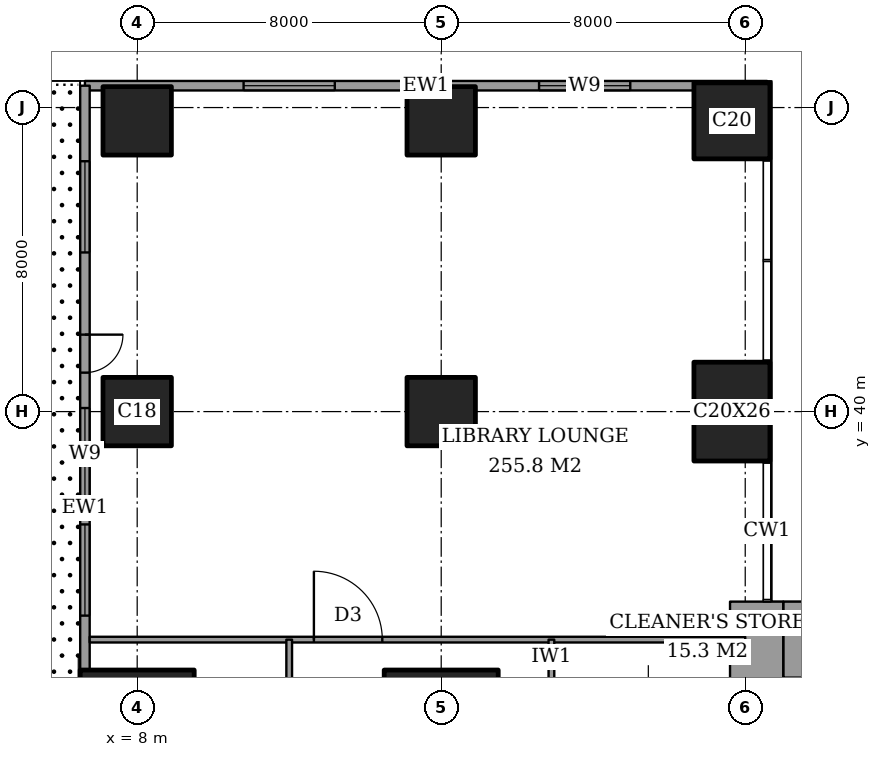
"""IFC4 building model, lengths in metres.
Left out: names, types, materials, properties, quantities, classifications, styles, units other than length and angle.
Written with IfcOpenShell. Run it as: python <this file> out.ifc"""

import sys

from ifc_helpers import new_model, si_unit, direction, frame, frame_2d, origin, origin_2d, place, context, subcontext, project, spatial, rectangle, extrude, element, fill, save


model = new_model("IFC4")
c1 = context("Model", 3, precision=1e-05, world=origin(), true_north=direction((0.0, 1.0)))
c2 = subcontext(c1, "Body", "Model", "MODEL_VIEW")
j1 = project(units=[si_unit("LENGTHUNIT", "METRE"), si_unit("PLANEANGLEUNIT", "RADIAN")], contexts=[c1])
p1 = place(None, origin())
s1 = spatial("IfcSite", under=j1, at=p1, CompositionType="ELEMENT")
p2 = place(p1, origin())
s2 = spatial("IfcBuilding", under=s1, at=p2, CompositionType="ELEMENT")
p3 = place(p2, frame((0.0, 0.0, 218.2)))
s3 = spatial("IfcBuildingStorey", under=s2, at=p3, CompositionType="ELEMENT", Elevation=218.2)
p4 = place(p3, frame((8.0, 32.0, 0.0), z_axis=(0.0, 0.0, 1.0), x_axis=(1.0, 0.0, 0.0)))
e1 = element("IfcColumn", 1, at=p4, inside=s3, PredefinedType="COLUMN", context=c2, shape_type="SweptSolid", body=[
    extrude(rectangle(XDim=3.0, YDim=2.4, at=origin_2d()), origin(), (0.0, 0.0, 1.0), 3.6),
])
for number, where, z_axis, x_axis in (
    (2, (8.0, 40.0, 0.0), (0.0, 0.0, 1.0), (1.0, 0.0, 0.0)),
    (3, (8.0, 47.65, 0.0), (0.0, 0.0, 1.0), (1.0, 0.0, 0.0)),
):
    element("IfcColumn", number, at=place(p3, frame(where, z_axis=z_axis, x_axis=x_axis)), inside=s3, PredefinedType="COLUMN", context=c2, shape_type="SweptSolid", body=[
        extrude(rectangle(XDim=1.8, YDim=1.8, at=origin_2d()), origin(), (0.0, 0.0, 1.0), 3.6),
    ])
p5 = place(p3, frame((16.0, 32.0, 0.0), z_axis=(0.0, 0.0, 1.0), x_axis=(1.0, 0.0, 0.0)))
e4 = element("IfcColumn", 4, at=p5, inside=s3, PredefinedType="COLUMN", context=c2, shape_type="SweptSolid", body=[
    extrude(rectangle(XDim=3.0, YDim=2.4, at=origin_2d()), origin(), (0.0, 0.0, 1.0), 3.6),
])
for number, where, z_axis, x_axis in (
    (5, (16.0, 40.0, 0.0), (0.0, 0.0, 1.0), (1.0, 0.0, 0.0)),
    (6, (16.0, 47.65, 0.0), (0.0, 0.0, 1.0), (1.0, 0.0, 0.0)),
):
    element("IfcColumn", number, at=place(p3, frame(where, z_axis=z_axis, x_axis=x_axis)), inside=s3, PredefinedType="COLUMN", context=c2, shape_type="SweptSolid", body=[
        extrude(rectangle(XDim=1.8, YDim=1.8, at=origin_2d()), origin(), (0.0, 0.0, 1.0), 3.6),
    ])
p6 = place(p3, frame((23.65, 40.0, 0.0), z_axis=(0.0, 0.0, 1.0), x_axis=(1.0, 0.0, 0.0)))
e7 = element("IfcColumn", 7, at=p6, inside=s3, PredefinedType="COLUMN", context=c2, shape_type="SweptSolid", body=[
    extrude(rectangle(XDim=2.0, YDim=2.6, at=origin_2d()), origin(), (0.0, 0.0, 1.0), 3.6),
])
p7 = place(p3, frame((23.65, 47.65, 0.0), z_axis=(0.0, 0.0, 1.0), x_axis=(1.0, 0.0, 0.0)))
e8 = element("IfcColumn", 8, at=p7, inside=s3, PredefinedType="COLUMN", context=c2, shape_type="SweptSolid", body=[
    extrude(rectangle(XDim=2.0, YDim=2.0, at=origin_2d()), origin(), (0.0, 0.0, 1.0), 3.6),
])
p8 = place(p3, frame((25.0, 34.0, 0.0), z_axis=(0.0, 0.0, 1.0), x_axis=(1.0, 0.0, 0.0)))
e9 = element("IfcWall", 9, at=p8, inside=s3, PredefinedType="SHEAR", context=c2, shape_type="SweptSolid", body=[
    extrude(rectangle(XDim=3.15, YDim=2.0, at=frame_2d((1.575, 0.0))), origin(), (0.0, 0.0, 1.0), 3.6),
])
p9 = place(p3, frame((24.3, 23.15, 0.0), z_axis=(0.0, 0.0, 1.0), x_axis=(0.0, 1.0, 0.0)))
e10 = element("IfcWall", 10, at=p9, inside=s3, PredefinedType="SHEAR", context=c2, shape_type="SweptSolid", body=[
    extrude(rectangle(XDim=11.85, YDim=1.4, at=frame_2d((5.925, 0.0))), origin(), (0.0, 0.0, 1.0), 3.6),
])
p10 = place(p9, frame((0.75, 0.0, 0.0)))
e11 = element("IfcOpeningElement", 11, at=p10, cuts=e10, PredefinedType="OPENING", context=c2, shape_type="SweptSolid", body=[
    extrude(rectangle(XDim=1.8, YDim=2.4, at=frame_2d((0.9, 1.2))), frame((0.0, 0.71, 0.0), z_axis=(0.0, -1.0, 0.0), x_axis=(1.0, 0.0, 0.0)), (0.0, 0.0, 1.0), 1.42),
])
p11 = place(p3, frame((24.575, 48.575, 0.0), z_axis=(0.0, 0.0, 1.0), x_axis=(-1.0, 0.0, 0.0)))
e12 = element("IfcWall", 12, at=p11, inside=s3, PredefinedType="SOLIDWALL", context=c2, shape_type="SweptSolid", body=[
    extrude(rectangle(XDim=17.95, YDim=0.25, at=frame_2d((8.975, 0.0))), origin(), (0.0, 0.0, 1.0), 3.6),
])
p12 = place(p11, frame((3.6, 0.0, 0.2)))
e13 = element("IfcOpeningElement", 13, at=p12, cuts=e12, PredefinedType="OPENING", context=c2, shape_type="SweptSolid", body=[
    extrude(rectangle(XDim=2.4, YDim=2.4, at=frame_2d((1.2, 1.2))), frame((0.0, 0.135, 0.0), z_axis=(0.0, -1.0, 0.0), x_axis=(1.0, 0.0, 0.0)), (0.0, 0.0, 1.0), 0.27),
])
p13 = place(p11, frame((11.375, 0.0, 0.2)))
e14 = element("IfcOpeningElement", 14, at=p13, cuts=e12, PredefinedType="OPENING", context=c2, shape_type="SweptSolid", body=[
    extrude(rectangle(XDim=2.4, YDim=2.4, at=frame_2d((1.2, 1.2))), frame((0.0, 0.135, 0.0), z_axis=(0.0, -1.0, 0.0), x_axis=(1.0, 0.0, 0.0)), (0.0, 0.0, 1.0), 0.27),
])
p14 = place(p3, frame((6.625, 48.575, 0.0), z_axis=(0.0, 0.0, 1.0), x_axis=(0.0, -1.0, 0.0)))
e15 = element("IfcWall", 15, at=p14, inside=s3, PredefinedType="SOLIDWALL", context=c2, shape_type="SweptSolid", body=[
    extrude(rectangle(XDim=20.225, YDim=0.25, at=frame_2d((10.112, 0.0))), origin(), (0.0, 0.0, 1.0), 3.6),
])
p15 = place(p14, frame((6.55, 0.0, 0.0)))
e16 = element("IfcOpeningElement", 16, at=p15, cuts=e15, PredefinedType="OPENING", context=c2, shape_type="SweptSolid", body=[
    extrude(rectangle(XDim=1.0, YDim=2.4, at=frame_2d((0.5, 1.2))), frame((0.0, 0.135, 0.0), z_axis=(0.0, -1.0, 0.0), x_axis=(1.0, 0.0, 0.0)), (0.0, 0.0, 1.0), 0.27),
])
p16 = place(p14, frame((1.988, 0.0, 0.2)))
e17 = element("IfcOpeningElement", 17, at=p16, cuts=e15, PredefinedType="OPENING", context=c2, shape_type="SweptSolid", body=[
    extrude(rectangle(XDim=2.4, YDim=2.4, at=frame_2d((1.2, 1.2))), frame((0.0, 0.135, 0.0), z_axis=(0.0, -1.0, 0.0), x_axis=(1.0, 0.0, 0.0)), (0.0, 0.0, 1.0), 0.27),
])
p17 = place(p14, frame((8.481, 0.0, 0.2)))
e18 = element("IfcOpeningElement", 18, at=p17, cuts=e15, PredefinedType="OPENING", context=c2, shape_type="SweptSolid", body=[
    extrude(rectangle(XDim=2.4, YDim=2.4, at=frame_2d((1.2, 1.2))), frame((0.0, 0.135, 0.0), z_axis=(0.0, -1.0, 0.0), x_axis=(1.0, 0.0, 0.0)), (0.0, 0.0, 1.0), 0.27),
])
p18 = place(p14, frame((11.544, 0.0, 0.2)))
e19 = element("IfcOpeningElement", 19, at=p18, cuts=e15, PredefinedType="OPENING", context=c2, shape_type="SweptSolid", body=[
    extrude(rectangle(XDim=2.4, YDim=2.4, at=frame_2d((1.2, 1.2))), frame((0.0, 0.135, 0.0), z_axis=(0.0, -1.0, 0.0), x_axis=(1.0, 0.0, 0.0)), (0.0, 0.0, 1.0), 0.27),
])
p19 = place(p14, frame((18.488, 0.0, 0.0)))
e20 = element("IfcOpeningElement", 20, at=p19, cuts=e15, PredefinedType="OPENING", context=c2, shape_type="SweptSolid", body=[
    extrude(rectangle(XDim=1.0, YDim=2.4, at=frame_2d((0.5, 1.2))), frame((0.0, 0.135, 0.0), z_axis=(0.0, -1.0, 0.0), x_axis=(1.0, 0.0, 0.0)), (0.0, 0.0, 1.0), 0.27),
])
p20 = place(p3, frame((6.75, 34.0, 0.0), z_axis=(0.0, 0.0, 1.0), x_axis=(1.0, 0.0, 0.0)))
e21 = element("IfcWall", 21, at=p20, inside=s3, PredefinedType="PARTITIONING", context=c2, shape_type="SweptSolid", body=[
    extrude(rectangle(XDim=17.25, YDim=0.15, at=frame_2d((8.625, 0.0))), origin(), (0.0, 0.0, 1.0), 3.35),
])
p21 = place(p20, frame((5.9, 0.0, 0.0)))
e22 = element("IfcOpeningElement", 22, at=p21, cuts=e21, PredefinedType="OPENING", context=c2, shape_type="SweptSolid", body=[
    extrude(rectangle(XDim=1.8, YDim=2.1, at=frame_2d((0.9, 1.05))), frame((0.0, 0.085, 0.0), z_axis=(0.0, -1.0, 0.0), x_axis=(1.0, 0.0, 0.0)), (0.0, 0.0, 1.0), 0.17),
])
p22 = place(p3, frame((12.0, 14.0, 0.0), z_axis=(0.0, 0.0, 1.0), x_axis=(0.0, 1.0, 0.0)))
e23 = element("IfcWall", 23, at=p22, inside=s3, PredefinedType="PARTITIONING", context=c2, shape_type="SweptSolid", body=[
    extrude(rectangle(XDim=20.0, YDim=0.15, at=frame_2d((10.0, 0.0))), origin(), (0.0, 0.0, 1.0), 3.35),
])
p23 = place(p22, frame((9.1, 0.0, 0.0)))
e24 = element("IfcOpeningElement", 24, at=p23, cuts=e23, PredefinedType="OPENING", context=c2, shape_type="SweptSolid", body=[
    extrude(rectangle(XDim=1.8, YDim=2.1, at=frame_2d((0.9, 1.05))), frame((0.0, 0.085, 0.0), z_axis=(0.0, -1.0, 0.0), x_axis=(1.0, 0.0, 0.0)), (0.0, 0.0, 1.0), 0.17),
])
p24 = place(p3, frame((18.9, 31.0, 0.0), z_axis=(0.0, 0.0, 1.0), x_axis=(0.0, 1.0, 0.0)))
e25 = element("IfcWall", 25, at=p24, inside=s3, PredefinedType="PARTITIONING", context=c2, shape_type="SweptSolid", body=[
    extrude(rectangle(XDim=3.0, YDim=0.15, at=frame_2d((1.5, 0.0))), origin(), (0.0, 0.0, 1.0), 3.35),
])
p25 = place(p24, frame((1.05, 0.0, 0.0)))
e26 = element("IfcOpeningElement", 26, at=p25, cuts=e25, PredefinedType="OPENING", context=c2, shape_type="SweptSolid", body=[
    extrude(rectangle(XDim=0.9, YDim=2.1, at=frame_2d((0.45, 1.05))), frame((0.0, 0.085, 0.0), z_axis=(0.0, -1.0, 0.0), x_axis=(1.0, 0.0, 0.0)), (0.0, 0.0, 1.0), 0.17),
])
p26 = place(p12, origin())
e27 = element("IfcWindow", 27, at=p26, inside=s3, PartitioningType="SINGLE_PANEL", PredefinedType="WINDOW", context=c2, shape_type="SweptSolid", body=[
    extrude(rectangle(XDim=2.4, YDim=2.4, at=frame_2d((1.2, 1.2))), frame((0.0, 0.03, 0.0), z_axis=(0.0, -1.0, 0.0), x_axis=(1.0, 0.0, 0.0)), (0.0, 0.0, 1.0), 0.06),
])
fill(e13, e27)
p27 = place(p13, origin())
e28 = element("IfcWindow", 28, at=p27, inside=s3, PartitioningType="SINGLE_PANEL", PredefinedType="WINDOW", context=c2, shape_type="SweptSolid", body=[
    extrude(rectangle(XDim=2.4, YDim=2.4, at=frame_2d((1.2, 1.2))), frame((0.0, 0.03, 0.0), z_axis=(0.0, -1.0, 0.0), x_axis=(1.0, 0.0, 0.0)), (0.0, 0.0, 1.0), 0.06),
])
fill(e14, e28)
p28 = place(p15, origin())
e29 = element("IfcDoor", 29, at=p28, inside=s3, OperationType="SINGLE_SWING_RIGHT", PredefinedType="DOOR", context=c2, shape_type="SweptSolid", body=[
    extrude(rectangle(XDim=1.0, YDim=2.4, at=frame_2d((0.5, 1.2))), frame((0.0, 0.025, 0.0), z_axis=(0.0, -1.0, 0.0), x_axis=(1.0, 0.0, 0.0)), (0.0, 0.0, 1.0), 0.05),
])
fill(e16, e29)
p29 = place(p16, origin())
e30 = element("IfcWindow", 30, at=p29, inside=s3, PartitioningType="SINGLE_PANEL", PredefinedType="WINDOW", context=c2, shape_type="SweptSolid", body=[
    extrude(rectangle(XDim=2.4, YDim=2.4, at=frame_2d((1.2, 1.2))), frame((0.0, 0.03, 0.0), z_axis=(0.0, -1.0, 0.0), x_axis=(1.0, 0.0, 0.0)), (0.0, 0.0, 1.0), 0.06),
])
fill(e17, e30)
p30 = place(p17, origin())
e31 = element("IfcWindow", 31, at=p30, inside=s3, PartitioningType="SINGLE_PANEL", PredefinedType="WINDOW", context=c2, shape_type="SweptSolid", body=[
    extrude(rectangle(XDim=2.4, YDim=2.4, at=frame_2d((1.2, 1.2))), frame((0.0, 0.03, 0.0), z_axis=(0.0, -1.0, 0.0), x_axis=(1.0, 0.0, 0.0)), (0.0, 0.0, 1.0), 0.06),
])
fill(e18, e31)
p31 = place(p18, origin())
e32 = element("IfcWindow", 32, at=p31, inside=s3, PartitioningType="SINGLE_PANEL", PredefinedType="WINDOW", context=c2, shape_type="SweptSolid", body=[
    extrude(rectangle(XDim=2.4, YDim=2.4, at=frame_2d((1.2, 1.2))), frame((0.0, 0.03, 0.0), z_axis=(0.0, -1.0, 0.0), x_axis=(1.0, 0.0, 0.0)), (0.0, 0.0, 1.0), 0.06),
])
fill(e19, e32)
p32 = place(p21, origin())
e33 = element("IfcDoor", 33, at=p32, inside=s3, OperationType="DOUBLE_DOOR_DOUBLE_SWING", PredefinedType="DOOR", context=c2, shape_type="SweptSolid", body=[
    extrude(rectangle(XDim=1.8, YDim=2.1, at=frame_2d((0.9, 1.05))), frame((0.0, 0.025, 0.0), z_axis=(0.0, -1.0, 0.0), x_axis=(1.0, 0.0, 0.0)), (0.0, 0.0, 1.0), 0.05),
])
fill(e22, e33)
save(model, sys.argv[1])
